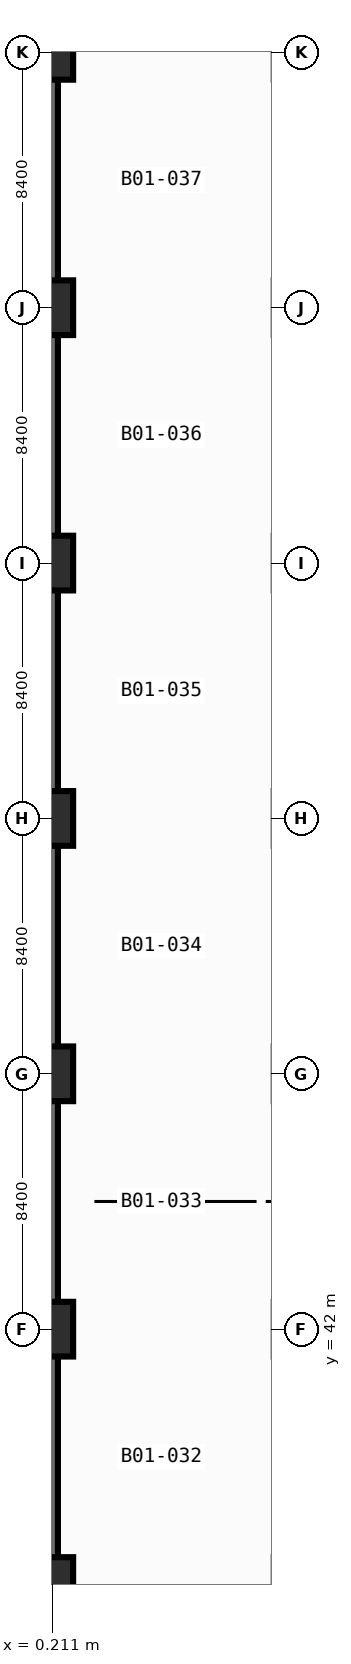
"""IFC4 building model, lengths in metres.
Left out: names, types, materials, properties, quantities, classifications, styles, units other than length and angle.
Written with IfcOpenShell. Run it as: python <this file> out.ifc"""

import sys

from ifc_helpers import new_model, si_unit, direction, frame, frame_2d, origin, origin_2d, place, context, subcontext, project, spatial, rectangle, extrude, element, save


model = new_model("IFC4")
c1 = context("Model", 3, precision=1e-05, world=origin(), true_north=direction((0.0, 1.0)))
c2 = subcontext(c1, "Body", "Model", "MODEL_VIEW")
j1 = project(units=[si_unit("LENGTHUNIT", "METRE"), si_unit("PLANEANGLEUNIT", "RADIAN")], contexts=[c1])
p1 = place(None, origin())
s1 = spatial("IfcSite", under=j1, at=p1, CompositionType="ELEMENT")
p2 = place(p1, origin())
s2 = spatial("IfcBuilding", under=s1, at=p2, CompositionType="ELEMENT")
p3 = place(p2, frame((0.0, 0.0, -4.2)))
s3 = spatial("IfcBuildingStorey", under=s2, at=p3, CompositionType="ELEMENT", Elevation=-4.2)
p4 = place(p3, frame((0.0, 92.0, 0.0), z_axis=(0.0, 0.0, 1.0), x_axis=(0.0, -1.0, 0.0)))
e1 = element("IfcWall", 1, at=p4, inside=s3, PredefinedType="USERDEFINED", context=c2, shape_type="SweptSolid", body=[
    extrude(rectangle(XDim=91.6, YDim=0.8, at=frame_2d((45.8, 0.0))), origin(), (0.0, 0.0, 1.0), 3.62),
])
for number, where, z_axis, x_axis in (
    (2, (0.0, 33.6, 0.0), (0.0, 0.0, 1.0), (1.0, 0.0, 0.0)),
    (3, (0.0, 42.0, 0.0), (0.0, 0.0, 1.0), (1.0, 0.0, 0.0)),
    (4, (0.0, 50.4, 0.0), (0.0, 0.0, 1.0), (1.0, 0.0, 0.0)),
    (5, (0.0, 58.8, 0.0), (0.0, 0.0, 1.0), (1.0, 0.0, 0.0)),
    (6, (0.0, 67.2, 0.0), (0.0, 0.0, 1.0), (1.0, 0.0, 0.0)),
    (7, (0.0, 75.6, 0.0), (0.0, 0.0, 1.0), (1.0, 0.0, 0.0)),
    (8, (0.0, 84.0, 0.0), (0.0, 0.0, 1.0), (1.0, 0.0, 0.0)),
):
    element("IfcColumn", number, at=place(p3, frame(where, z_axis=z_axis, x_axis=x_axis)), inside=s3, PredefinedType="COLUMN", context=c2, shape_type="SweptSolid", body=[
        extrude(rectangle(XDim=1.8, YDim=1.8, at=origin_2d()), origin(), (0.0, 0.0, 1.0), 4.2),
    ])
save(model, sys.argv[1])
